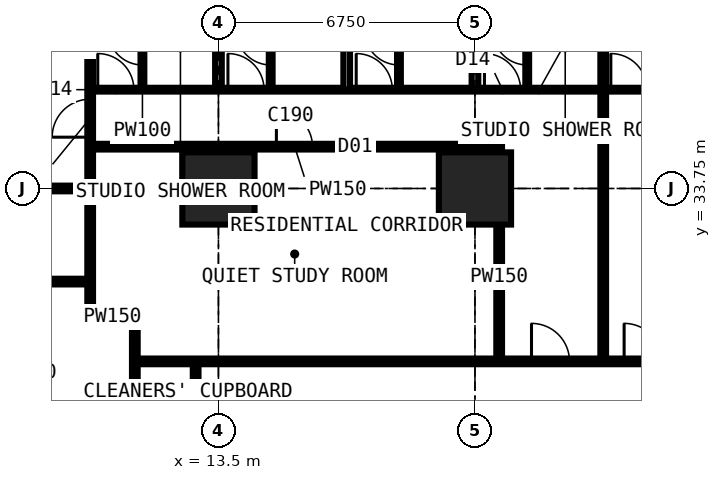
"""IFC4 building model, lengths in metres.
Left out: names, types, materials, properties, quantities, classifications, styles, units other than length and angle.
Written with IfcOpenShell. Run it as: python <this file> out.ifc"""

import sys

from ifc_helpers import new_model, si_unit, direction, frame, frame_2d, origin, origin_2d, place, context, subcontext, project, spatial, rectangle, extrude, element, fill, save


model = new_model("IFC4")
c1 = context("Model", 3, precision=1e-05, world=origin(), true_north=direction((0.0, 1.0)))
c2 = subcontext(c1, "Body", "Model", "MODEL_VIEW")
j1 = project(units=[si_unit("LENGTHUNIT", "METRE"), si_unit("PLANEANGLEUNIT", "RADIAN")], contexts=[c1])
p1 = place(None, origin())
s1 = spatial("IfcSite", under=j1, at=p1, CompositionType="ELEMENT")
p2 = place(p1, origin())
s2 = spatial("IfcBuilding", under=s1, at=p2, CompositionType="ELEMENT")
p3 = place(p2, frame((0.0, 0.0, 25.2)))
s3 = spatial("IfcBuildingStorey", under=s2, at=p3, CompositionType="ELEMENT", Elevation=25.2)
for number, where, z_axis, x_axis in (
    (1, (13.5, 33.75, 0.0), (0.0, 0.0, 1.0), (1.0, 0.0, 0.0)),
    (2, (20.25, 33.75, 0.0), (0.0, 0.0, 1.0), (1.0, 0.0, 0.0)),
):
    element("IfcColumn", number, at=place(p3, frame(where, z_axis=z_axis, x_axis=x_axis)), inside=s3, PredefinedType="COLUMN", context=c2, shape_type="SweptSolid", body=[
        extrude(rectangle(XDim=1.9, YDim=1.9, at=origin_2d()), origin(), (0.0, 0.0, 1.0), 3.6),
    ])
p4 = place(p3, frame((-0.734, 33.75, 0.0), z_axis=(0.0, 0.0, 1.0), x_axis=(1.0, 0.0, 0.0)))
e3 = element("IfcWall", 3, at=p4, inside=s3, PredefinedType="PARTITIONING", context=c2, shape_type="SweptSolid", body=[
    extrude(rectangle(XDim=10.859, YDim=0.15, at=frame_2d((5.429, 0.0))), origin(), (0.0, 0.0, 1.0), 2.877),
])
p5 = place(p3, frame((5.65, 31.3, 0.0), z_axis=(0.0, 0.0, 1.0), x_axis=(1.0, 0.0, 0.0)))
e4 = element("IfcWall", 4, at=p5, inside=s3, PredefinedType="PARTITIONING", context=c2, shape_type="SweptSolid", body=[
    extrude(rectangle(XDim=4.475, YDim=0.15, at=frame_2d((2.238, 0.0))), origin(), (0.0, 0.0, 1.0), 3.375),
])
p6 = place(p3, frame((10.125, 30.375, 0.0), z_axis=(0.0, 0.0, 1.0), x_axis=(0.0, 1.0, 0.0)))
e5 = element("IfcWall", 5, at=p6, inside=s3, PredefinedType="PARTITIONING", context=c2, shape_type="SweptSolid", body=[
    extrude(rectangle(XDim=10.859, YDim=0.15, at=frame_2d((5.429, 0.0))), origin(), (0.0, 0.0, 1.0), 3.375),
])
p7 = place(p6, frame((4.725, 0.0, 0.0)))
e6 = element("IfcOpeningElement", 6, at=p7, cuts=e5, PredefinedType="OPENING", context=c2, shape_type="SweptSolid", body=[
    extrude(rectangle(XDim=1.0, YDim=2.2, at=frame_2d((0.5, 1.1))), frame((0.0, 0.085, 0.0), z_axis=(0.0, -1.0, 0.0), x_axis=(1.0, 0.0, 0.0)), (0.0, 0.0, 1.0), 0.17),
])
p8 = place(p3, frame((10.125, 30.375, 0.0), z_axis=(0.0, 0.0, 1.0), x_axis=(1.0, 0.0, 0.0)))
e7 = element("IfcWall", 7, at=p8, inside=s3, PredefinedType="PARTITIONING", context=c2, shape_type="SweptSolid", body=[
    extrude(rectangle(XDim=1.175, YDim=0.15, at=frame_2d((0.587, 0.0))), origin(), (0.0, 0.0, 1.0), 3.375),
])
p9 = place(p3, frame((10.125, 34.85, 0.0), z_axis=(0.0, 0.0, 1.0), x_axis=(1.0, 0.0, 0.0)))
e8 = element("IfcWall", 8, at=p9, inside=s3, PredefinedType="PARTITIONING", context=c2, shape_type="SweptSolid", body=[
    extrude(rectangle(XDim=10.762, YDim=0.15, at=frame_2d((5.381, 0.0))), origin(), (0.0, 0.0, 1.0), 3.375),
])
p10 = place(p9, frame((4.9, 0.0, 0.0)))
e9 = element("IfcOpeningElement", 9, at=p10, cuts=e8, PredefinedType="OPENING", context=c2, shape_type="SweptSolid", body=[
    extrude(rectangle(XDim=0.95, YDim=2.2, at=frame_2d((0.475, 1.1))), frame((0.0, 0.085, 0.0), z_axis=(0.0, -1.0, 0.0), x_axis=(1.0, 0.0, 0.0)), (0.0, 0.0, 1.0), 0.17),
])
p11 = place(p3, frame((10.125, 36.35, 0.0), z_axis=(0.0, 0.0, 1.0), x_axis=(1.0, 0.0, 0.0)))
e10 = element("IfcWall", 10, at=p11, inside=s3, PredefinedType="PARTITIONING", context=c2, shape_type="SweptSolid", body=[
    extrude(rectangle(XDim=23.625, YDim=0.1, at=frame_2d((11.812, 0.0))), origin(), (0.0, 0.0, 1.0), 3.375),
])
p12 = place(p11, frame((21.45, 0.0, 0.0)))
e11 = element("IfcOpeningElement", 11, at=p12, cuts=e10, PredefinedType="OPENING", context=c2, shape_type="SweptSolid", body=[
    extrude(rectangle(XDim=1.0, YDim=2.2, at=frame_2d((0.5, 1.1))), frame((0.0, 0.06, 0.0), z_axis=(0.0, -1.0, 0.0), x_axis=(1.0, 0.0, 0.0)), (0.0, 0.0, 1.0), 0.12),
])
p13 = place(p11, frame((17.125, 0.0, 0.0)))
e12 = element("IfcOpeningElement", 12, at=p13, cuts=e10, PredefinedType="OPENING", context=c2, shape_type="SweptSolid", body=[
    extrude(rectangle(XDim=0.95, YDim=2.2, at=frame_2d((0.475, 1.1))), frame((0.0, 0.06, 0.0), z_axis=(0.0, -1.0, 0.0), x_axis=(1.0, 0.0, 0.0)), (0.0, 0.0, 1.0), 0.12),
])
p14 = place(p11, frame((13.7, 0.0, 0.0)))
e13 = element("IfcOpeningElement", 13, at=p14, cuts=e10, PredefinedType="OPENING", context=c2, shape_type="SweptSolid", body=[
    extrude(rectangle(XDim=0.95, YDim=2.2, at=frame_2d((0.475, 1.1))), frame((0.0, 0.06, 0.0), z_axis=(0.0, -1.0, 0.0), x_axis=(1.0, 0.0, 0.0)), (0.0, 0.0, 1.0), 0.12),
])
p15 = place(p11, frame((0.2, 0.0, 0.0)))
e14 = element("IfcOpeningElement", 14, at=p15, cuts=e10, PredefinedType="OPENING", context=c2, shape_type="SweptSolid", body=[
    extrude(rectangle(XDim=0.95, YDim=2.2, at=frame_2d((0.475, 1.1))), frame((0.0, 0.06, 0.0), z_axis=(0.0, -1.0, 0.0), x_axis=(1.0, 0.0, 0.0)), (0.0, 0.0, 1.0), 0.12),
])
p16 = place(p11, frame((3.625, 0.0, 0.0)))
e15 = element("IfcOpeningElement", 15, at=p16, cuts=e10, PredefinedType="OPENING", context=c2, shape_type="SweptSolid", body=[
    extrude(rectangle(XDim=0.95, YDim=2.2, at=frame_2d((0.475, 1.1))), frame((0.0, 0.06, 0.0), z_axis=(0.0, -1.0, 0.0), x_axis=(1.0, 0.0, 0.0)), (0.0, 0.0, 1.0), 0.12),
])
p17 = place(p11, frame((7.0, 0.0, 0.0)))
e16 = element("IfcOpeningElement", 16, at=p17, cuts=e10, PredefinedType="OPENING", context=c2, shape_type="SweptSolid", body=[
    extrude(rectangle(XDim=0.95, YDim=2.2, at=frame_2d((0.475, 1.1))), frame((0.0, 0.06, 0.0), z_axis=(0.0, -1.0, 0.0), x_axis=(1.0, 0.0, 0.0)), (0.0, 0.0, 1.0), 0.12),
])
p18 = place(p11, frame((10.375, 0.0, 0.0)))
e17 = element("IfcOpeningElement", 17, at=p18, cuts=e10, PredefinedType="OPENING", context=c2, shape_type="SweptSolid", body=[
    extrude(rectangle(XDim=0.95, YDim=2.2, at=frame_2d((0.475, 1.1))), frame((0.0, 0.06, 0.0), z_axis=(0.0, -1.0, 0.0), x_axis=(1.0, 0.0, 0.0)), (0.0, 0.0, 1.0), 0.12),
])
p19 = place(p3, frame((11.3, 11.3, 0.0), z_axis=(0.0, 0.0, 1.0), x_axis=(0.0, 1.0, 0.0)))
e18 = element("IfcWall", 18, at=p19, inside=s3, PredefinedType="PARTITIONING", context=c2, shape_type="SweptSolid", body=[
    extrude(rectangle(XDim=19.075, YDim=0.15, at=frame_2d((9.538, 0.0))), origin(), (0.0, 0.0, 1.0), 3.375),
])
p20 = place(p19, frame((10.137, 0.0, 0.0)))
e19 = element("IfcOpeningElement", 19, at=p20, cuts=e18, PredefinedType="OPENING", context=c2, shape_type="SweptSolid", body=[
    extrude(rectangle(XDim=1.0, YDim=2.2, at=frame_2d((0.5, 1.1))), frame((0.0, 0.085, 0.0), z_axis=(0.0, -1.0, 0.0), x_axis=(1.0, 0.0, 0.0)), (0.0, 0.0, 1.0), 0.17),
])
p21 = place(p3, frame((11.3, 29.2, 0.0), z_axis=(0.0, 0.0, 1.0), x_axis=(1.0, 0.0, 0.0)))
e20 = element("IfcWall", 20, at=p21, inside=s3, PredefinedType="PARTITIONING", context=c2, shape_type="SweptSolid", body=[
    extrude(rectangle(XDim=19.075, YDim=0.15, at=frame_2d((9.538, 0.0))), origin(), (0.0, 0.0, 1.0), 3.375),
])
p22 = place(p21, frame((12.875, 0.0, 0.0)))
e21 = element("IfcOpeningElement", 21, at=p22, cuts=e20, PredefinedType="OPENING", context=c2, shape_type="SweptSolid", body=[
    extrude(rectangle(XDim=1.0, YDim=2.2, at=frame_2d((0.5, 1.1))), frame((0.0, 0.085, 0.0), z_axis=(0.0, -1.0, 0.0), x_axis=(1.0, 0.0, 0.0)), (0.0, 0.0, 1.0), 0.17),
])
p23 = place(p21, frame((10.438, 0.0, 0.0)))
e22 = element("IfcOpeningElement", 22, at=p23, cuts=e20, PredefinedType="OPENING", context=c2, shape_type="SweptSolid", body=[
    extrude(rectangle(XDim=1.0, YDim=2.2, at=frame_2d((0.5, 1.1))), frame((0.0, 0.085, 0.0), z_axis=(0.0, -1.0, 0.0), x_axis=(1.0, 0.0, 0.0)), (0.0, 0.0, 1.0), 0.17),
])
p24 = place(p21, frame((15.675, 0.0, 0.0)))
e23 = element("IfcOpeningElement", 23, at=p24, cuts=e20, PredefinedType="OPENING", context=c2, shape_type="SweptSolid", body=[
    extrude(rectangle(XDim=0.95, YDim=2.2, at=frame_2d((0.475, 1.1))), frame((0.0, 0.085, 0.0), z_axis=(0.0, -1.0, 0.0), x_axis=(1.0, 0.0, 0.0)), (0.0, 0.0, 1.0), 0.17),
])
p25 = place(p3, frame((11.5, 36.35, 0.0), z_axis=(0.0, 0.0, 1.0), x_axis=(0.0, 1.0, 0.0)))
e24 = element("IfcWall", 24, at=p25, inside=s3, PredefinedType="PARTITIONING", context=c2, shape_type="SweptSolid", body=[
    extrude(rectangle(XDim=2.2, YDim=0.1, at=frame_2d((1.1, 0.0))), origin(), (0.0, 0.0, 1.0), 3.375),
])
p26 = place(p25, frame((0.65, 0.0, 0.0)))
e25 = element("IfcOpeningElement", 25, at=p26, cuts=e24, PredefinedType="OPENING", context=c2, shape_type="SweptSolid", body=[
    extrude(rectangle(XDim=0.9, YDim=2.2, at=frame_2d((0.45, 1.1))), frame((0.0, 0.06, 0.0), z_axis=(0.0, -1.0, 0.0), x_axis=(1.0, 0.0, 0.0)), (0.0, 0.0, 1.0), 0.12),
])
p27 = place(p3, frame((12.9, 27.6, 0.0), z_axis=(0.0, 0.0, 1.0), x_axis=(0.0, 1.0, 0.0)))
e26 = element("IfcWall", 26, at=p27, inside=s3, PredefinedType="PARTITIONING", context=c2, shape_type="SweptSolid", body=[
    extrude(rectangle(XDim=1.6, YDim=0.15, at=frame_2d((0.8, 0.0))), origin(), (0.0, 0.0, 1.0), 3.375),
])
p28 = place(p3, frame((13.5, 36.35, 0.0), z_axis=(0.0, 0.0, 1.0), x_axis=(0.0, 1.0, 0.0)))
e27 = element("IfcWall", 27, at=p28, inside=s3, PredefinedType="PARTITIONING", context=c2, shape_type="SweptSolid", body=[
    extrude(rectangle(XDim=4.884, YDim=0.175, at=frame_2d((2.442, 0.0))), origin(), (0.0, 0.0, 1.0), 2.877),
])
p29 = place(p3, frame((14.875, 36.35, 0.0), z_axis=(0.0, 0.0, 1.0), x_axis=(0.0, 1.0, 0.0)))
e28 = element("IfcWall", 28, at=p29, inside=s3, PredefinedType="PARTITIONING", context=c2, shape_type="SweptSolid", body=[
    extrude(rectangle(XDim=2.2, YDim=0.1, at=frame_2d((1.1, 0.0))), origin(), (0.0, 0.0, 1.0), 3.375),
])
p30 = place(p29, frame((0.65, 0.0, 0.0)))
e29 = element("IfcOpeningElement", 29, at=p30, cuts=e28, PredefinedType="OPENING", context=c2, shape_type="SweptSolid", body=[
    extrude(rectangle(XDim=0.9, YDim=2.2, at=frame_2d((0.45, 1.1))), frame((0.0, 0.06, 0.0), z_axis=(0.0, -1.0, 0.0), x_axis=(1.0, 0.0, 0.0)), (0.0, 0.0, 1.0), 0.12),
])
p31 = place(p3, frame((16.875, 36.35, 0.0), z_axis=(0.0, 0.0, 1.0), x_axis=(0.0, 1.0, 0.0)))
e30 = element("IfcWall", 30, at=p31, inside=s3, PredefinedType="PARTITIONING", context=c2, shape_type="SweptSolid", body=[
    extrude(rectangle(XDim=4.884, YDim=0.175, at=frame_2d((2.442, 0.0))), origin(), (0.0, 0.0, 1.0), 3.375),
])
p32 = place(p3, frame((18.25, 36.35, 0.0), z_axis=(0.0, 0.0, 1.0), x_axis=(0.0, 1.0, 0.0)))
e31 = element("IfcWall", 31, at=p32, inside=s3, PredefinedType="PARTITIONING", context=c2, shape_type="SweptSolid", body=[
    extrude(rectangle(XDim=2.2, YDim=0.1, at=frame_2d((1.1, 0.0))), origin(), (0.0, 0.0, 1.0), 3.375),
])
p33 = place(p32, frame((0.65, 0.0, 0.0)))
e32 = element("IfcOpeningElement", 32, at=p33, cuts=e31, PredefinedType="OPENING", context=c2, shape_type="SweptSolid", body=[
    extrude(rectangle(XDim=0.9, YDim=2.2, at=frame_2d((0.45, 1.1))), frame((0.0, 0.06, 0.0), z_axis=(0.0, -1.0, 0.0), x_axis=(1.0, 0.0, 0.0)), (0.0, 0.0, 1.0), 0.12),
])
p34 = place(p3, frame((20.25, 36.35, 0.0), z_axis=(0.0, 0.0, 1.0), x_axis=(0.0, 1.0, 0.0)))
e33 = element("IfcWall", 33, at=p34, inside=s3, PredefinedType="PARTITIONING", context=c2, shape_type="SweptSolid", body=[
    extrude(rectangle(XDim=4.884, YDim=0.175, at=frame_2d((2.442, 0.0))), origin(), (0.0, 0.0, 1.0), 2.61),
])
p35 = place(p3, frame((20.887, 29.2, 0.0), z_axis=(0.0, 0.0, 1.0), x_axis=(0.0, 1.0, 0.0)))
e34 = element("IfcWall", 34, at=p35, inside=s3, PredefinedType="PARTITIONING", context=c2, shape_type="SweptSolid", body=[
    extrude(rectangle(XDim=5.65, YDim=0.15, at=frame_2d((2.825, 0.0))), origin(), (0.0, 0.0, 1.0), 3.375),
])
p36 = place(p3, frame((21.625, 36.35, 0.0), z_axis=(0.0, 0.0, 1.0), x_axis=(0.0, 1.0, 0.0)))
e35 = element("IfcWall", 35, at=p36, inside=s3, PredefinedType="PARTITIONING", context=c2, shape_type="SweptSolid", body=[
    extrude(rectangle(XDim=2.2, YDim=0.1, at=frame_2d((1.1, 0.0))), origin(), (0.0, 0.0, 1.0), 3.375),
])
p37 = place(p36, frame((0.65, 0.0, 0.0)))
e36 = element("IfcOpeningElement", 36, at=p37, cuts=e35, PredefinedType="OPENING", context=c2, shape_type="SweptSolid", body=[
    extrude(rectangle(XDim=0.9, YDim=2.2, at=frame_2d((0.45, 1.1))), frame((0.0, 0.06, 0.0), z_axis=(0.0, -1.0, 0.0), x_axis=(1.0, 0.0, 0.0)), (0.0, 0.0, 1.0), 0.12),
])
p38 = place(p3, frame((23.625, 29.2, 0.0), z_axis=(0.0, 0.0, 1.0), x_axis=(0.0, 1.0, 0.0)))
e37 = element("IfcWall", 37, at=p38, inside=s3, PredefinedType="PARTITIONING", context=c2, shape_type="SweptSolid", body=[
    extrude(rectangle(XDim=12.034, YDim=0.15, at=frame_2d((6.017, 0.0))), origin(), (0.0, 0.0, 1.0), 3.375),
])
p39 = place(p14, origin())
e38 = element("IfcDoor", 38, at=p39, inside=s3, OperationType="SINGLE_SWING_LEFT", PredefinedType="DOOR", context=c2, shape_type="SweptSolid", body=[
    extrude(rectangle(XDim=0.95, YDim=2.2, at=frame_2d((0.475, 1.1))), frame((0.0, 0.025, 0.0), z_axis=(0.0, -1.0, 0.0), x_axis=(1.0, 0.0, 0.0)), (0.0, 0.0, 1.0), 0.05),
])
fill(e13, e38)
p40 = place(p22, origin())
e39 = element("IfcDoor", 39, at=p40, inside=s3, OperationType="SINGLE_SWING_LEFT", PredefinedType="DOOR", context=c2, shape_type="SweptSolid", body=[
    extrude(rectangle(XDim=1.0, YDim=2.2, at=frame_2d((0.5, 1.1))), frame((0.0, 0.025, 0.0), z_axis=(0.0, -1.0, 0.0), x_axis=(1.0, 0.0, 0.0)), (0.0, 0.0, 1.0), 0.05),
])
fill(e21, e39)
p41 = place(p15, origin())
e40 = element("IfcDoor", 40, at=p41, inside=s3, OperationType="SINGLE_SWING_LEFT", PredefinedType="DOOR", context=c2, shape_type="SweptSolid", body=[
    extrude(rectangle(XDim=0.95, YDim=2.2, at=frame_2d((0.475, 1.1))), frame((0.0, 0.025, 0.0), z_axis=(0.0, -1.0, 0.0), x_axis=(1.0, 0.0, 0.0)), (0.0, 0.0, 1.0), 0.05),
])
fill(e14, e40)
p42 = place(p26, origin())
e41 = element("IfcDoor", 41, at=p42, inside=s3, OperationType="SINGLE_SWING_RIGHT", PredefinedType="DOOR", context=c2, shape_type="SweptSolid", body=[
    extrude(rectangle(XDim=0.9, YDim=2.2, at=frame_2d((0.45, 1.1))), frame((0.0, 0.025, 0.0), z_axis=(0.0, -1.0, 0.0), x_axis=(1.0, 0.0, 0.0)), (0.0, 0.0, 1.0), 0.05),
])
fill(e25, e41)
p43 = place(p16, origin())
e42 = element("IfcDoor", 42, at=p43, inside=s3, OperationType="SINGLE_SWING_LEFT", PredefinedType="DOOR", context=c2, shape_type="SweptSolid", body=[
    extrude(rectangle(XDim=0.95, YDim=2.2, at=frame_2d((0.475, 1.1))), frame((0.0, 0.025, 0.0), z_axis=(0.0, -1.0, 0.0), x_axis=(1.0, 0.0, 0.0)), (0.0, 0.0, 1.0), 0.05),
])
fill(e15, e42)
p44 = place(p30, origin())
e43 = element("IfcDoor", 43, at=p44, inside=s3, OperationType="SINGLE_SWING_RIGHT", PredefinedType="DOOR", context=c2, shape_type="SweptSolid", body=[
    extrude(rectangle(XDim=0.9, YDim=2.2, at=frame_2d((0.45, 1.1))), frame((0.0, 0.025, 0.0), z_axis=(0.0, -1.0, 0.0), x_axis=(1.0, 0.0, 0.0)), (0.0, 0.0, 1.0), 0.05),
])
fill(e29, e43)
p45 = place(p17, origin())
e44 = element("IfcDoor", 44, at=p45, inside=s3, OperationType="SINGLE_SWING_LEFT", PredefinedType="DOOR", context=c2, shape_type="SweptSolid", body=[
    extrude(rectangle(XDim=0.95, YDim=2.2, at=frame_2d((0.475, 1.1))), frame((0.0, 0.025, 0.0), z_axis=(0.0, -1.0, 0.0), x_axis=(1.0, 0.0, 0.0)), (0.0, 0.0, 1.0), 0.05),
])
fill(e16, e44)
p46 = place(p33, origin())
e45 = element("IfcDoor", 45, at=p46, inside=s3, OperationType="SINGLE_SWING_RIGHT", PredefinedType="DOOR", context=c2, shape_type="SweptSolid", body=[
    extrude(rectangle(XDim=0.9, YDim=2.2, at=frame_2d((0.45, 1.1))), frame((0.0, 0.025, 0.0), z_axis=(0.0, -1.0, 0.0), x_axis=(1.0, 0.0, 0.0)), (0.0, 0.0, 1.0), 0.05),
])
fill(e32, e45)
p47 = place(p18, origin())
e46 = element("IfcDoor", 46, at=p47, inside=s3, OperationType="SINGLE_SWING_LEFT", PredefinedType="DOOR", context=c2, shape_type="SweptSolid", body=[
    extrude(rectangle(XDim=0.95, YDim=2.2, at=frame_2d((0.475, 1.1))), frame((0.0, 0.025, 0.0), z_axis=(0.0, -1.0, 0.0), x_axis=(1.0, 0.0, 0.0)), (0.0, 0.0, 1.0), 0.05),
])
fill(e17, e46)
p48 = place(p37, origin())
e47 = element("IfcDoor", 47, at=p48, inside=s3, OperationType="SINGLE_SWING_RIGHT", PredefinedType="DOOR", context=c2, shape_type="SweptSolid", body=[
    extrude(rectangle(XDim=0.9, YDim=2.2, at=frame_2d((0.45, 1.1))), frame((0.0, 0.025, 0.0), z_axis=(0.0, -1.0, 0.0), x_axis=(1.0, 0.0, 0.0)), (0.0, 0.0, 1.0), 0.05),
])
fill(e36, e47)
p49 = place(p23, origin())
e48 = element("IfcDoor", 48, at=p49, inside=s3, OperationType="SINGLE_SWING_LEFT", PredefinedType="DOOR", context=c2, shape_type="SweptSolid", body=[
    extrude(rectangle(XDim=1.0, YDim=2.2, at=frame_2d((0.5, 1.1))), frame((0.0, 0.025, 0.0), z_axis=(0.0, -1.0, 0.0), x_axis=(1.0, 0.0, 0.0)), (0.0, 0.0, 1.0), 0.05),
])
fill(e22, e48)
p50 = place(p10, origin())
e49 = element("IfcDoor", 49, at=p50, inside=s3, OperationType="SINGLE_SWING_LEFT", PredefinedType="DOOR", context=c2, shape_type="SweptSolid", body=[
    extrude(rectangle(XDim=0.95, YDim=2.2, at=frame_2d((0.475, 1.1))), frame((0.0, 0.025, 0.0), z_axis=(0.0, -1.0, 0.0), x_axis=(1.0, 0.0, 0.0)), (0.0, 0.0, 1.0), 0.05),
])
fill(e9, e49)
p51 = place(p7, origin())
e50 = element("IfcDoor", 50, at=p51, inside=s3, OperationType="SINGLE_SWING_LEFT", PredefinedType="DOOR", context=c2, shape_type="SweptSolid", body=[
    extrude(rectangle(XDim=1.0, YDim=2.2, at=frame_2d((0.5, 1.1))), frame((0.0, 0.025, 0.0), z_axis=(0.0, -1.0, 0.0), x_axis=(1.0, 0.0, 0.0)), (0.0, 0.0, 1.0), 0.05),
])
fill(e6, e50)
save(model, sys.argv[1])
